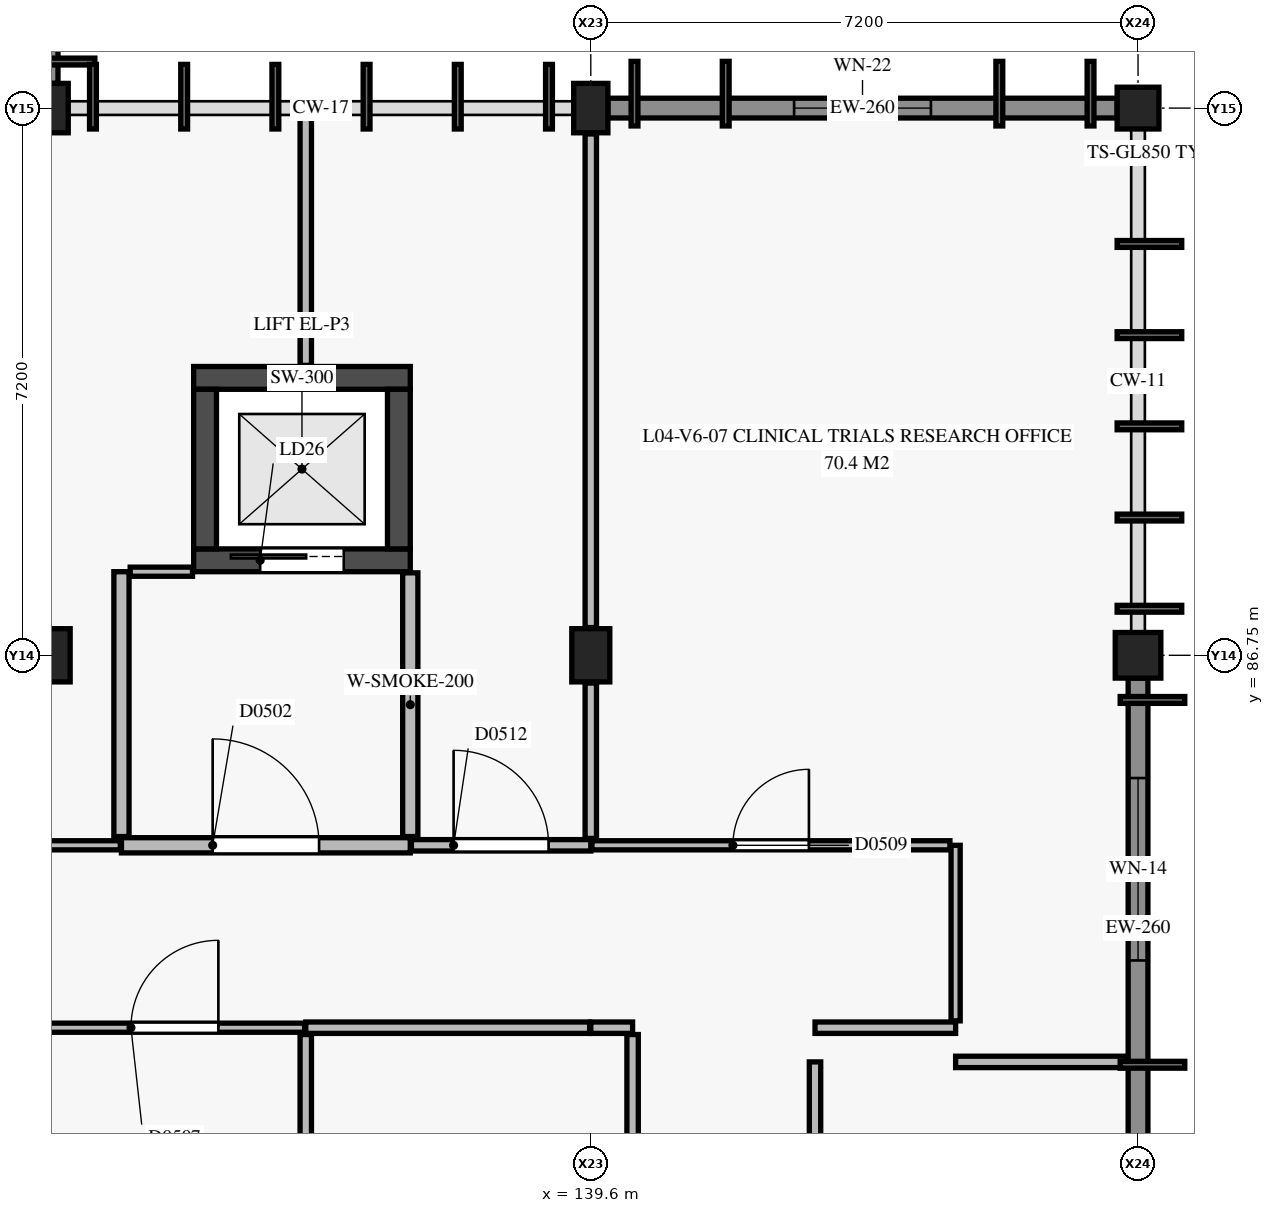
"""IFC4 building model, lengths in metres.
Left out: names, types, materials, properties, quantities, classifications, styles, units other than length and angle.
Written with IfcOpenShell. Run it as: python <this file> out.ifc"""

import sys

from ifc_helpers import new_model, si_unit, direction, frame, frame_2d, origin, origin_2d, place, context, subcontext, project, spatial, rectangle, extrude, element, fill, save


model = new_model("IFC4")
c1 = context("Model", 3, precision=1e-05, world=origin(), true_north=direction((0.0, 1.0)))
c2 = subcontext(c1, "Body", "Model", "MODEL_VIEW")
j1 = project(units=[si_unit("LENGTHUNIT", "METRE"), si_unit("PLANEANGLEUNIT", "RADIAN")], contexts=[c1])
p1 = place(None, origin())
s1 = spatial("IfcSite", under=j1, at=p1, CompositionType="ELEMENT")
p2 = place(p1, origin())
s2 = spatial("IfcBuilding", under=s1, at=p2, CompositionType="ELEMENT")
p3 = place(p2, frame((0.0, 0.0, 17.4)))
s3 = spatial("IfcBuildingStorey", under=s2, at=p3, CompositionType="ELEMENT", Elevation=17.4)
p4 = place(p3, frame((132.4, 86.75, 0.0), z_axis=(0.0, 0.0, 1.0), x_axis=(1.0, 0.0, 0.0)))
e1 = element("IfcColumn", 1, at=p4, inside=s3, PredefinedType="COLUMN", context=c2, shape_type="SweptSolid", body=[
    extrude(rectangle(XDim=0.7, YDim=0.7, at=origin_2d()), origin(), (0.0, 0.0, 1.0), 4.05),
])
p5 = place(p3, frame((132.4, 93.95, 0.0), z_axis=(0.0, 0.0, 1.0), x_axis=(1.0, 0.0, 0.0)))
e2 = element("IfcColumn", 2, at=p5, inside=s3, PredefinedType="COLUMN", context=c2, shape_type="SweptSolid", body=[
    extrude(rectangle(XDim=0.65, YDim=0.65, at=origin_2d()), origin(), (0.0, 0.0, 1.0), 4.36),
])
p6 = place(p3, frame((139.6, 86.75, 0.0), z_axis=(0.0, 0.0, 1.0), x_axis=(1.0, 0.0, 0.0)))
e3 = element("IfcColumn", 3, at=p6, inside=s3, PredefinedType="COLUMN", context=c2, shape_type="SweptSolid", body=[
    extrude(rectangle(XDim=0.5, YDim=0.7, at=origin_2d()), origin(), (0.0, 0.0, 1.0), 4.05),
])
p7 = place(p3, frame((139.6, 93.95, 0.0), z_axis=(0.0, 0.0, 1.0), x_axis=(1.0, 0.0, 0.0)))
e4 = element("IfcColumn", 4, at=p7, inside=s3, PredefinedType="COLUMN", context=c2, shape_type="SweptSolid", body=[
    extrude(rectangle(XDim=0.45, YDim=0.65, at=origin_2d()), origin(), (0.0, 0.0, 1.0), 4.36),
])
p8 = place(p3, frame((146.8, 86.75, 0.0), z_axis=(0.0, 0.0, 1.0), x_axis=(1.0, 0.0, 0.0)))
e5 = element("IfcColumn", 5, at=p8, inside=s3, PredefinedType="COLUMN", context=c2, shape_type="SweptSolid", body=[
    extrude(rectangle(XDim=0.6, YDim=0.6, at=origin_2d()), origin(), (0.0, 0.0, 1.0), 4.05),
])
p9 = place(p3, frame((146.8, 93.95, 0.0), z_axis=(0.0, 0.0, 1.0), x_axis=(1.0, 0.0, 0.0)))
e6 = element("IfcColumn", 6, at=p9, inside=s3, PredefinedType="COLUMN", context=c2, shape_type="SweptSolid", body=[
    extrude(rectangle(XDim=0.55, YDim=0.55, at=origin_2d()), origin(), (0.0, 0.0, 1.0), 4.36),
])
p10 = place(p3, frame((134.375, 88.0, 0.0), z_axis=(0.0, 0.0, 1.0), x_axis=(1.0, 0.0, 0.0)))
e7 = element("IfcWall", 7, at=p10, inside=s3, PredefinedType="SHEAR", context=c2, shape_type="SweptSolid", body=[
    extrude(rectangle(XDim=2.85, YDim=0.3, at=frame_2d((1.425, 0.0))), origin(), (0.0, 0.0, 1.0), 3.95),
])
p11 = place(p10, frame((0.875, 0.0, 0.0)))
e8 = element("IfcOpeningElement", 8, at=p11, cuts=e7, PredefinedType="OPENING", context=c2, shape_type="SweptSolid", body=[
    extrude(rectangle(XDim=1.1, YDim=2.15, at=frame_2d((0.55, 1.075))), frame((0.0, 0.16, 0.0), z_axis=(0.0, -1.0, 0.0), x_axis=(1.0, 0.0, 0.0)), (0.0, 0.0, 1.0), 0.32),
])
p12 = place(p3, frame((134.375, 90.4, 0.0), z_axis=(0.0, 0.0, 1.0), x_axis=(1.0, 0.0, 0.0)))
e9 = element("IfcWall", 9, at=p12, inside=s3, PredefinedType="SHEAR", context=c2, shape_type="SweptSolid", body=[
    extrude(rectangle(XDim=2.85, YDim=0.3, at=frame_2d((1.425, 0.0))), origin(), (0.0, 0.0, 1.0), 3.95),
])
for number, where, z_axis, x_axis in (
    (10, (134.525, 88.15, 0.0), (0.0, 0.0, 1.0), (0.0, 1.0, 0.0)),
    (11, (137.075, 88.15, 0.0), (0.0, 0.0, 1.0), (0.0, 1.0, 0.0)),
):
    element("IfcWall", number, at=place(p3, frame(where, z_axis=z_axis, x_axis=x_axis)), inside=s3, PredefinedType="SHEAR", context=c2, shape_type="SweptSolid", body=[
        extrude(rectangle(XDim=2.1, YDim=0.3, at=frame_2d((1.05, 0.0))), origin(), (0.0, 0.0, 1.0), 3.95),
    ])
p13 = place(p3, frame((146.8, 86.45, 0.0), z_axis=(0.0, 0.0, 1.0), x_axis=(0.0, -1.0, 0.0)))
e12 = element("IfcWall", 12, at=p13, inside=s3, PredefinedType="SOLIDWALL", context=c2, shape_type="SweptSolid", body=[
    extrude(rectangle(XDim=6.575, YDim=0.26, at=frame_2d((3.288, 0.0))), origin(), (0.0, 0.0, 1.0), 3.38),
])
p14 = place(p13, frame((1.315, 0.0, 0.9)))
e13 = element("IfcOpeningElement", 13, at=p14, cuts=e12, PredefinedType="OPENING", context=c2, shape_type="SweptSolid", body=[
    extrude(rectangle(XDim=2.4, YDim=1.5, at=frame_2d((1.2, 0.75))), frame((0.0, 0.14, 0.0), z_axis=(0.0, -1.0, 0.0), x_axis=(1.0, 0.0, 0.0)), (0.0, 0.0, 1.0), 0.28),
])
p15 = place(p3, frame((132.4, 100.85, 0.0), z_axis=(0.0, 0.0, 1.0), x_axis=(0.0, -1.0, 0.0)))
e14 = element("IfcWall", 14, at=p15, inside=s3, PredefinedType="USERDEFINED", context=c2, shape_type="SweptSolid", body=[
    extrude(rectangle(XDim=6.575, YDim=0.38, at=frame_2d((3.288, 0.0))), origin(), (0.0, 0.0, 1.0), 3.38),
])
p16 = place(p15, frame((2.0, 0.0, 0.9)))
e15 = element("IfcOpeningElement", 15, at=p16, cuts=e14, PredefinedType="OPENING", context=c2, shape_type="SweptSolid", body=[
    extrude(rectangle(XDim=0.9, YDim=1.2, at=frame_2d((0.45, 0.6))), frame((0.0, 0.2, 0.0), z_axis=(0.0, -1.0, 0.0), x_axis=(1.0, 0.0, 0.0)), (0.0, 0.0, 1.0), 0.4),
])
p17 = place(p3, frame((139.825, 93.95, 0.0), z_axis=(0.0, 0.0, 1.0), x_axis=(1.0, 0.0, 0.0)))
e16 = element("IfcWall", 16, at=p17, inside=s3, PredefinedType="SOLIDWALL", context=c2, shape_type="SweptSolid", body=[
    extrude(rectangle(XDim=6.7, YDim=0.26, at=frame_2d((3.35, 0.0))), origin(), (0.0, 0.0, 1.0), 3.32),
])
p18 = place(p17, frame((2.45, 0.0, 0.9)))
e17 = element("IfcOpeningElement", 17, at=p18, cuts=e16, PredefinedType="OPENING", context=c2, shape_type="SweptSolid", body=[
    extrude(rectangle(XDim=1.8, YDim=0.9, at=frame_2d((0.9, 0.45))), frame((0.0, 0.14, 0.0), z_axis=(0.0, -1.0, 0.0), x_axis=(1.0, 0.0, 0.0)), (0.0, 0.0, 1.0), 0.28),
])
p19 = place(p3, frame((133.425, 84.25, 0.0), z_axis=(0.0, 0.0, 1.0), x_axis=(1.0, 0.0, 0.0)))
e18 = element("IfcWall", 18, at=p19, inside=s3, PredefinedType="PARTITIONING", context=c2, shape_type="SweptSolid", body=[
    extrude(rectangle(XDim=3.8, YDim=0.2, at=frame_2d((1.9, 0.0))), origin(), (0.0, 0.0, 1.0), 3.95),
])
p20 = place(p19, frame((1.2, 0.0, 0.0)))
e19 = element("IfcOpeningElement", 19, at=p20, cuts=e18, PredefinedType="OPENING", context=c2, shape_type="SweptSolid", body=[
    extrude(rectangle(XDim=1.4, YDim=2.2, at=frame_2d((0.7, 1.1))), frame((0.0, 0.11, 0.0), z_axis=(0.0, -1.0, 0.0), x_axis=(1.0, 0.0, 0.0)), (0.0, 0.0, 1.0), 0.22),
])
p21 = place(p3, frame((137.225, 84.365, 0.0), z_axis=(0.0, 0.0, 1.0), x_axis=(0.0, 1.0, 0.0)))
e20 = element("IfcWall", 20, at=p21, inside=s3, PredefinedType="PARTITIONING", context=c2, shape_type="SweptSolid", body=[
    extrude(rectangle(XDim=3.47, YDim=0.2, at=frame_2d((1.735, 0.0))), origin(), (0.0, 0.0, 1.0), 3.44),
])
p22 = place(p3, frame((133.425, 84.365, 0.0), z_axis=(0.0, 0.0, 1.0), x_axis=(0.0, 1.0, 0.0)))
e21 = element("IfcWall", 21, at=p22, inside=s3, PredefinedType="PARTITIONING", context=c2, shape_type="SweptSolid", body=[
    extrude(rectangle(XDim=3.485, YDim=0.2, at=frame_2d((1.743, 0.0))), origin(), (0.0, 0.0, 1.0), 3.44),
])
p23 = place(p3, frame((142.55, 76.165, 0.0), z_axis=(0.0, 0.0, 1.0), x_axis=(0.0, 1.0, 0.0)))
e22 = element("IfcWall", 22, at=p23, inside=s3, PredefinedType="PARTITIONING", context=c2, shape_type="SweptSolid", body=[
    extrude(rectangle(XDim=5.235, YDim=0.15, at=frame_2d((2.617, 0.0))), origin(), (0.0, 0.0, 1.0), 3.44),
])
p24 = place(p23, frame((2.143, 0.0, 0.0)))
e23 = element("IfcOpeningElement", 23, at=p24, cuts=e22, PredefinedType="OPENING", context=c2, shape_type="SweptSolid", body=[
    extrude(rectangle(XDim=0.95, YDim=2.1, at=frame_2d((0.475, 1.05))), frame((0.0, 0.085, 0.0), z_axis=(0.0, -1.0, 0.0), x_axis=(1.0, 0.0, 0.0)), (0.0, 0.0, 1.0), 0.17),
])
p25 = place(p3, frame((142.55, 81.85, 0.0), z_axis=(0.0, 0.0, 1.0), x_axis=(1.0, 0.0, 0.0)))
e24 = element("IfcWall", 24, at=p25, inside=s3, PredefinedType="PARTITIONING", context=c2, shape_type="SweptSolid", body=[
    extrude(rectangle(XDim=1.85, YDim=0.15, at=frame_2d((0.925, 0.0))), origin(), (0.0, 0.0, 1.0), 3.95),
])
p26 = place(p3, frame((139.6, 81.85, 0.0), z_axis=(0.0, 0.0, 1.0), x_axis=(1.0, 0.0, 0.0)))
e25 = element("IfcWall", 25, at=p26, inside=s3, PredefinedType="PARTITIONING", context=c2, shape_type="SweptSolid", body=[
    extrude(rectangle(XDim=0.55, YDim=0.15, at=frame_2d((0.275, 0.0))), origin(), (0.0, 0.0, 1.0), 3.95),
])
p27 = place(p3, frame((140.15, 71.75, 0.0), z_axis=(0.0, 0.0, 1.0), x_axis=(0.0, 1.0, 0.0)))
e26 = element("IfcWall", 26, at=p27, inside=s3, PredefinedType="PARTITIONING", context=c2, shape_type="SweptSolid", body=[
    extrude(rectangle(XDim=10.01, YDim=0.15, at=frame_2d((5.005, 0.0))), origin(), (0.0, 0.0, 1.0), 3.44),
])
p28 = place(p27, frame((4.48, 0.0, 0.0)))
e27 = element("IfcOpeningElement", 27, at=p28, cuts=e26, PredefinedType="OPENING", context=c2, shape_type="SweptSolid", body=[
    extrude(rectangle(XDim=1.05, YDim=2.15, at=frame_2d((0.525, 1.075))), frame((0.0, 0.085, 0.0), z_axis=(0.0, -1.0, 0.0), x_axis=(1.0, 0.0, 0.0)), (0.0, 0.0, 1.0), 0.17),
])
p29 = place(p3, frame((135.85, 81.85, 0.0), z_axis=(0.0, 0.0, 1.0), x_axis=(1.0, 0.0, 0.0)))
e28 = element("IfcWall", 28, at=p29, inside=s3, PredefinedType="PARTITIONING", context=c2, shape_type="SweptSolid", body=[
    extrude(rectangle(XDim=3.735, YDim=0.15, at=frame_2d((1.867, 0.0))), origin(), (0.0, 0.0, 1.0), 3.95),
])
p30 = place(p3, frame((137.24, 84.25, 0.0), z_axis=(0.0, 0.0, 1.0), x_axis=(1.0, 0.0, 0.0)))
e29 = element("IfcWall", 29, at=p30, inside=s3, PredefinedType="PARTITIONING", context=c2, shape_type="SweptSolid", body=[
    extrude(rectangle(XDim=2.36, YDim=0.15, at=frame_2d((1.18, 0.0))), origin(), (0.0, 0.0, 1.0), 3.95),
])
p31 = place(p30, frame((0.555, 0.0, 0.0)))
e30 = element("IfcOpeningElement", 30, at=p31, cuts=e29, PredefinedType="OPENING", context=c2, shape_type="SweptSolid", body=[
    extrude(rectangle(XDim=1.25, YDim=2.15, at=frame_2d((0.625, 1.075))), frame((0.0, 0.085, 0.0), z_axis=(0.0, -1.0, 0.0), x_axis=(1.0, 0.0, 0.0)), (0.0, 0.0, 1.0), 0.17),
])
p32 = place(p3, frame((132.415, 81.85, 0.0), z_axis=(0.0, 0.0, 1.0), x_axis=(1.0, 0.0, 0.0)))
e31 = element("IfcWall", 31, at=p32, inside=s3, PredefinedType="PARTITIONING", context=c2, shape_type="SweptSolid", body=[
    extrude(rectangle(XDim=3.42, YDim=0.12, at=frame_2d((1.71, 0.0))), origin(), (0.0, 0.0, 1.0), 3.95),
])
p33 = place(p32, frame((1.135, 0.0, 0.0)))
e32 = element("IfcOpeningElement", 32, at=p33, cuts=e31, PredefinedType="OPENING", context=c2, shape_type="SweptSolid", body=[
    extrude(rectangle(XDim=1.15, YDim=2.15, at=frame_2d((0.575, 1.075))), frame((0.0, 0.07, 0.0), z_axis=(0.0, -1.0, 0.0), x_axis=(1.0, 0.0, 0.0)), (0.0, 0.0, 1.0), 0.14),
])
p34 = place(p3, frame((144.4, 81.94, 0.0), z_axis=(0.0, 0.0, 1.0), x_axis=(0.0, 1.0, 0.0)))
e33 = element("IfcWall", 33, at=p34, inside=s3, PredefinedType="PARTITIONING", context=c2, shape_type="SweptSolid", body=[
    extrude(rectangle(XDim=2.31, YDim=0.12, at=frame_2d((1.155, 0.0))), origin(), (0.0, 0.0, 1.0), 3.95),
])
p35 = place(p3, frame((139.615, 84.25, 0.0), z_axis=(0.0, 0.0, 1.0), x_axis=(1.0, 0.0, 0.0)))
e34 = element("IfcWall", 34, at=p35, inside=s3, PredefinedType="PARTITIONING", context=c2, shape_type="SweptSolid", body=[
    extrude(rectangle(XDim=4.71, YDim=0.12, at=frame_2d((2.355, 0.0))), origin(), (0.0, 0.0, 1.0), 3.95),
])
p36 = place(p35, frame((1.855, 0.0, 0.0)))
e35 = element("IfcOpeningElement", 35, at=p36, cuts=e34, PredefinedType="OPENING", context=c2, shape_type="SweptSolid", body=[
    extrude(rectangle(XDim=1.0, YDim=2.15, at=frame_2d((0.5, 1.075))), frame((0.0, 0.07, 0.0), z_axis=(0.0, -1.0, 0.0), x_axis=(1.0, 0.0, 0.0)), (0.0, 0.0, 1.0), 0.14),
])
p37 = place(p3, frame((132.4, 84.25, 0.0), z_axis=(0.0, 0.0, 1.0), x_axis=(1.0, 0.0, 0.0)))
e36 = element("IfcWall", 36, at=p37, inside=s3, PredefinedType="PARTITIONING", context=c2, shape_type="SweptSolid", body=[
    extrude(rectangle(XDim=1.01, YDim=0.12, at=frame_2d((0.505, 0.0))), origin(), (0.0, 0.0, 1.0), 3.95),
])
p38 = place(p3, frame((144.4, 81.4, 0.0), z_axis=(0.0, 0.0, 1.0), x_axis=(1.0, 0.0, 0.0)))
e37 = element("IfcWall", 37, at=p38, inside=s3, PredefinedType="PARTITIONING", context=c2, shape_type="SweptSolid", body=[
    extrude(rectangle(XDim=2.255, YDim=0.15, at=frame_2d((1.127, 0.0))), origin(), (0.0, 0.0, 1.0), 3.95),
])
p39 = place(p3, frame((135.85, 71.84, 0.0), z_axis=(0.0, 0.0, 1.0), x_axis=(0.0, 1.0, 0.0)))
e38 = element("IfcWall", 38, at=p39, inside=s3, PredefinedType="PARTITIONING", context=c2, shape_type="SweptSolid", body=[
    extrude(rectangle(XDim=9.92, YDim=0.15, at=frame_2d((4.96, 0.0))), origin(), (0.0, 0.0, 1.0), 3.32),
])
p40 = place(p3, frame((139.6, 84.34, 0.0), z_axis=(0.0, 0.0, 1.0), x_axis=(0.0, 1.0, 0.0)))
e39 = element("IfcWall", 39, at=p40, inside=s3, PredefinedType="PARTITIONING", context=c2, shape_type="SweptSolid", body=[
    extrude(rectangle(XDim=2.045, YDim=0.15, at=frame_2d((1.022, 0.0))), origin(), (0.0, 0.0, 1.0), 3.95),
])
p41 = place(p3, frame((139.6, 87.115, 0.0), z_axis=(0.0, 0.0, 1.0), x_axis=(0.0, 1.0, 0.0)))
e40 = element("IfcWall", 40, at=p41, inside=s3, PredefinedType="PARTITIONING", context=c2, shape_type="SweptSolid", body=[
    extrude(rectangle(XDim=6.495, YDim=0.15, at=frame_2d((3.248, 0.0))), origin(), (0.0, 0.0, 1.0), 3.95),
])
p42 = place(p3, frame((135.85, 90.565, 0.0), z_axis=(0.0, 0.0, 1.0), x_axis=(0.0, 1.0, 0.0)))
e41 = element("IfcWall", 41, at=p42, inside=s3, PredefinedType="PARTITIONING", context=c2, shape_type="SweptSolid", body=[
    extrude(rectangle(XDim=3.28, YDim=0.15, at=frame_2d((1.64, 0.0))), origin(), (0.0, 0.0, 1.0), 3.22),
])
p43 = place(p3, frame((133.54, 87.85, 0.0), z_axis=(0.0, 0.0, 1.0), x_axis=(1.0, 0.0, 0.0)))
e42 = element("IfcWall", 42, at=p43, inside=s3, PredefinedType="PARTITIONING", context=c2, shape_type="SweptSolid", body=[
    extrude(rectangle(XDim=0.82, YDim=0.12, at=frame_2d((0.41, 0.0))), origin(), (0.0, 0.0, 1.0), 3.95),
])
p44 = place(p14, origin())
e43 = element("IfcWindow", 43, at=p44, inside=s3, PartitioningType="SINGLE_PANEL", PredefinedType="WINDOW", context=c2, shape_type="SweptSolid", body=[
    extrude(rectangle(XDim=2.4, YDim=1.5, at=frame_2d((1.2, 0.75))), frame((0.0, 0.03, 0.0), z_axis=(0.0, -1.0, 0.0), x_axis=(1.0, 0.0, 0.0)), (0.0, 0.0, 1.0), 0.06),
])
fill(e13, e43)
p45 = place(p18, origin())
e44 = element("IfcWindow", 44, at=p45, inside=s3, PartitioningType="SINGLE_PANEL", PredefinedType="WINDOW", context=c2, shape_type="SweptSolid", body=[
    extrude(rectangle(XDim=1.8, YDim=0.9, at=frame_2d((0.9, 0.45))), frame((0.0, 0.03, 0.0), z_axis=(0.0, -1.0, 0.0), x_axis=(1.0, 0.0, 0.0)), (0.0, 0.0, 1.0), 0.06),
])
fill(e17, e44)
p46 = place(p11, origin())
e45 = element("IfcDoor", 45, at=p46, inside=s3, OperationType="SLIDING_TO_LEFT", PredefinedType="DOOR", context=c2, shape_type="SweptSolid", body=[
    extrude(rectangle(XDim=1.1, YDim=2.15, at=frame_2d((0.55, 1.075))), frame((0.0, 0.025, 0.0), z_axis=(0.0, -1.0, 0.0), x_axis=(1.0, 0.0, 0.0)), (0.0, 0.0, 1.0), 0.05),
])
fill(e8, e45)
p47 = place(p20, origin())
e46 = element("IfcDoor", 46, at=p47, inside=s3, OperationType="SINGLE_SWING_LEFT", PredefinedType="DOOR", context=c2, shape_type="SweptSolid", body=[
    extrude(rectangle(XDim=1.4, YDim=2.2, at=frame_2d((0.7, 1.1))), frame((0.0, 0.025, 0.0), z_axis=(0.0, -1.0, 0.0), x_axis=(1.0, 0.0, 0.0)), (0.0, 0.0, 1.0), 0.05),
])
fill(e19, e46)
p48 = place(p33, origin())
e47 = element("IfcDoor", 47, at=p48, inside=s3, OperationType="SINGLE_SWING_RIGHT", PredefinedType="DOOR", context=c2, shape_type="SweptSolid", body=[
    extrude(rectangle(XDim=1.15, YDim=2.15, at=frame_2d((0.575, 1.075))), frame((0.0, 0.025, 0.0), z_axis=(0.0, -1.0, 0.0), x_axis=(1.0, 0.0, 0.0)), (0.0, 0.0, 1.0), 0.05),
])
fill(e32, e47)
p49 = place(p36, origin())
e48 = element("IfcDoor", 48, at=p49, inside=s3, OperationType="SINGLE_SWING_RIGHT", PredefinedType="DOOR", context=c2, shape_type="SweptSolid", body=[
    extrude(rectangle(XDim=1.0, YDim=2.15, at=frame_2d((0.5, 1.075))), frame((0.0, 0.025, 0.0), z_axis=(0.0, -1.0, 0.0), x_axis=(1.0, 0.0, 0.0)), (0.0, 0.0, 1.0), 0.05),
])
fill(e35, e48)
p50 = place(p31, origin())
e49 = element("IfcDoor", 49, at=p50, inside=s3, OperationType="SINGLE_SWING_LEFT", PredefinedType="DOOR", context=c2, shape_type="SweptSolid", body=[
    extrude(rectangle(XDim=1.25, YDim=2.15, at=frame_2d((0.625, 1.075))), frame((0.0, 0.025, 0.0), z_axis=(0.0, -1.0, 0.0), x_axis=(1.0, 0.0, 0.0)), (0.0, 0.0, 1.0), 0.05),
])
fill(e30, e49)
save(model, sys.argv[1])
